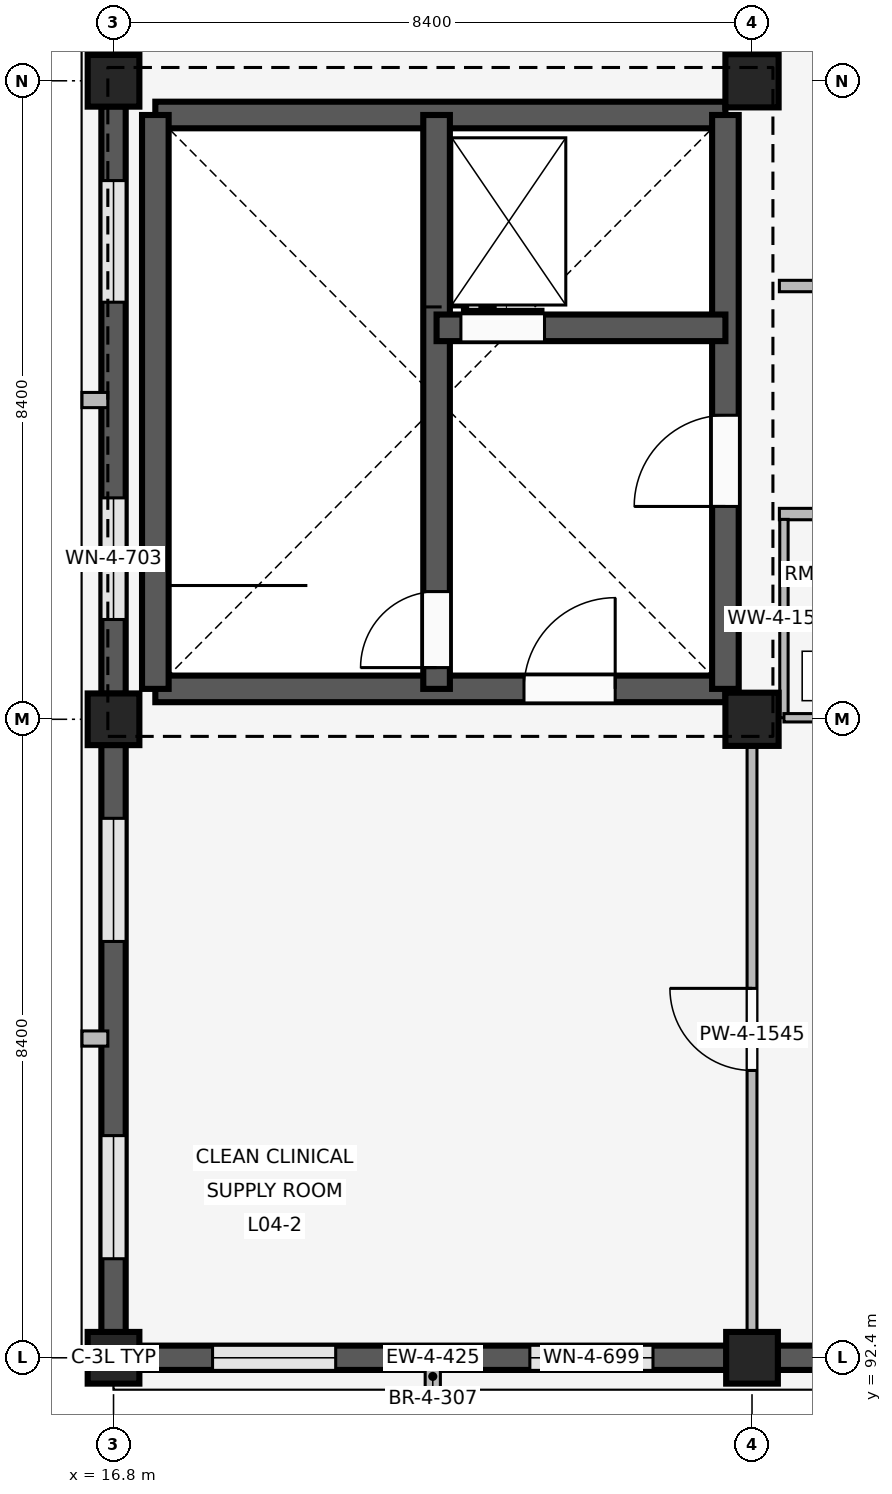
"""IFC4 building model, lengths in metres.
Left out: names, types, materials, properties, quantities, classifications, styles, units other than length and angle.
Written with IfcOpenShell. Run it as: python <this file> out.ifc"""

import sys

from ifc_helpers import new_model, si_unit, direction, frame, frame_2d, origin, origin_2d, place, context, subcontext, project, spatial, rectangle, extrude, element, fill, save


model = new_model("IFC4")
c1 = context("Model", 3, precision=1e-05, world=origin(), true_north=direction((0.0, 1.0)))
c2 = subcontext(c1, "Body", "Model", "MODEL_VIEW")
j1 = project(units=[si_unit("LENGTHUNIT", "METRE"), si_unit("PLANEANGLEUNIT", "RADIAN")], contexts=[c1])
p1 = place(None, origin())
s1 = spatial("IfcSite", under=j1, at=p1, CompositionType="ELEMENT")
p2 = place(p1, origin())
s2 = spatial("IfcBuilding", under=s1, at=p2, CompositionType="ELEMENT")
p3 = place(p2, frame((0.0, 0.0, 16.2)))
s3 = spatial("IfcBuildingStorey", under=s2, at=p3, CompositionType="ELEMENT", Elevation=16.2)
for number, where, z_axis, x_axis in (
    (1, (16.8, 92.4, 0.0), (0.0, 0.0, 1.0), (1.0, 0.0, 0.0)),
    (2, (16.8, 100.8, 0.0), (0.0, 0.0, 1.0), (1.0, 0.0, 0.0)),
    (3, (16.8, 109.2, 0.0), (0.0, 0.0, 1.0), (1.0, 0.0, 0.0)),
    (4, (25.2, 92.4, 0.0), (0.0, 0.0, 1.0), (1.0, 0.0, 0.0)),
):
    element("IfcColumn", number, at=place(p3, frame(where, z_axis=z_axis, x_axis=x_axis)), inside=s3, PredefinedType="COLUMN", context=c2, shape_type="SweptSolid", body=[
        extrude(rectangle(XDim=0.68, YDim=0.68, at=origin_2d()), origin(), (0.0, 0.0, 1.0), 4.2),
    ])
for number, where, z_axis, x_axis in (
    (5, (25.2, 100.8, 0.0), (0.0, 0.0, 1.0), (1.0, 0.0, 0.0)),
    (6, (25.2, 109.2, 0.0), (0.0, 0.0, 1.0), (1.0, 0.0, 0.0)),
):
    element("IfcColumn", number, at=place(p3, frame(where, z_axis=z_axis, x_axis=x_axis)), inside=s3, PredefinedType="COLUMN", context=c2, shape_type="SweptSolid", body=[
        extrude(rectangle(XDim=0.7, YDim=0.7, at=origin_2d()), origin(), (0.0, 0.0, 1.0), 4.2),
    ])
p4 = place(p3, frame((24.865, 92.4, 0.0), z_axis=(0.0, 0.0, 1.0), x_axis=(-1.0, 0.0, 0.0)))
e7 = element("IfcWall", 7, at=p4, inside=s3, PredefinedType="SOLIDWALL", context=c2, shape_type="SweptSolid", body=[
    extrude(rectangle(XDim=7.73, YDim=0.32, at=frame_2d((3.865, 0.0))), origin(), (0.0, 0.0, 1.0), 3.32),
])
p5 = place(p4, frame((0.968, 0.0, 0.85)))
e8 = element("IfcOpeningElement", 8, at=p5, cuts=e7, PredefinedType="OPENING", context=c2, shape_type="SweptSolid", body=[
    extrude(rectangle(XDim=1.62, YDim=1.52, at=frame_2d((0.81, 0.76))), frame((0.0, 0.17, 0.0), z_axis=(0.0, -1.0, 0.0), x_axis=(1.0, 0.0, 0.0)), (0.0, 0.0, 1.0), 0.34),
])
p6 = place(p4, frame((5.142, 0.0, 0.85)))
e9 = element("IfcOpeningElement", 9, at=p6, cuts=e7, PredefinedType="OPENING", context=c2, shape_type="SweptSolid", body=[
    extrude(rectangle(XDim=1.62, YDim=1.52, at=frame_2d((0.81, 0.76))), frame((0.0, 0.17, 0.0), z_axis=(0.0, -1.0, 0.0), x_axis=(1.0, 0.0, 0.0)), (0.0, 0.0, 1.0), 0.34),
])
p7 = place(p3, frame((21.0, 92.325, 0.0), z_axis=(0.0, 0.0, 1.0), x_axis=(0.0, -1.0, 0.0)))
e10 = element("IfcWall", 10, at=p7, inside=s3, PredefinedType="ELEMENTEDWALL", context=c2, shape_type="SweptSolid", body=[
    extrude(rectangle(XDim=0.34, YDim=0.2, at=frame_2d((0.17, 0.0))), origin(), (0.0, 0.0, 1.0), 3.3),
])
p8 = place(p3, frame((16.8, 92.735, 0.0), z_axis=(0.0, 0.0, 1.0), x_axis=(0.0, 1.0, 0.0)))
e11 = element("IfcWall", 11, at=p8, inside=s3, PredefinedType="SOLIDWALL", context=c2, shape_type="SweptSolid", body=[
    extrude(rectangle(XDim=7.73, YDim=0.32, at=frame_2d((3.865, 0.0))), origin(), (0.0, 0.0, 1.0), 3.32),
])
p9 = place(p8, frame((0.968, 0.0, 0.85)))
e12 = element("IfcOpeningElement", 12, at=p9, cuts=e11, PredefinedType="OPENING", context=c2, shape_type="SweptSolid", body=[
    extrude(rectangle(XDim=1.62, YDim=1.52, at=frame_2d((0.81, 0.76))), frame((0.0, 0.17, 0.0), z_axis=(0.0, -1.0, 0.0), x_axis=(1.0, 0.0, 0.0)), (0.0, 0.0, 1.0), 0.34),
])
p10 = place(p8, frame((5.142, 0.0, 0.85)))
e13 = element("IfcOpeningElement", 13, at=p10, cuts=e11, PredefinedType="OPENING", context=c2, shape_type="SweptSolid", body=[
    extrude(rectangle(XDim=1.62, YDim=1.52, at=frame_2d((0.81, 0.76))), frame((0.0, 0.17, 0.0), z_axis=(0.0, -1.0, 0.0), x_axis=(1.0, 0.0, 0.0)), (0.0, 0.0, 1.0), 0.34),
])
p11 = place(p3, frame((16.725, 96.6, 0.0), z_axis=(0.0, 0.0, 1.0), x_axis=(-1.0, 0.0, 0.0)))
e14 = element("IfcWall", 14, at=p11, inside=s3, PredefinedType="ELEMENTEDWALL", context=c2, shape_type="SweptSolid", body=[
    extrude(rectangle(XDim=0.34, YDim=0.2, at=frame_2d((0.17, 0.0))), origin(), (0.0, 0.0, 1.0), 3.3),
])
p12 = place(p3, frame((16.8, 101.135, 0.0), z_axis=(0.0, 0.0, 1.0), x_axis=(0.0, 1.0, 0.0)))
e15 = element("IfcWall", 15, at=p12, inside=s3, PredefinedType="SOLIDWALL", context=c2, shape_type="SweptSolid", body=[
    extrude(rectangle(XDim=7.73, YDim=0.32, at=frame_2d((3.865, 0.0))), origin(), (0.0, 0.0, 1.0), 3.32),
])
p13 = place(p12, frame((0.978, 0.0, 0.85)))
e16 = element("IfcOpeningElement", 16, at=p13, cuts=e15, PredefinedType="OPENING", context=c2, shape_type="SweptSolid", body=[
    extrude(rectangle(XDim=1.6, YDim=1.65, at=frame_2d((0.8, 0.825))), frame((0.0, 0.17, 0.0), z_axis=(0.0, -1.0, 0.0), x_axis=(1.0, 0.0, 0.0)), (0.0, 0.0, 1.0), 0.34),
])
p14 = place(p12, frame((5.152, 0.0, 0.85)))
e17 = element("IfcOpeningElement", 17, at=p14, cuts=e15, PredefinedType="OPENING", context=c2, shape_type="SweptSolid", body=[
    extrude(rectangle(XDim=1.6, YDim=1.65, at=frame_2d((0.8, 0.825))), frame((0.0, 0.17, 0.0), z_axis=(0.0, -1.0, 0.0), x_axis=(1.0, 0.0, 0.0)), (0.0, 0.0, 1.0), 0.34),
])
p15 = place(p3, frame((16.725, 105.0, 0.0), z_axis=(0.0, 0.0, 1.0), x_axis=(-1.0, 0.0, 0.0)))
e18 = element("IfcWall", 18, at=p15, inside=s3, PredefinedType="ELEMENTEDWALL", context=c2, shape_type="SweptSolid", body=[
    extrude(rectangle(XDim=0.34, YDim=0.2, at=frame_2d((0.17, 0.0))), origin(), (0.0, 0.0, 1.0), 3.3),
])
p16 = place(p3, frame((16.8, 109.535, 0.0), z_axis=(0.0, 0.0, 1.0), x_axis=(0.0, 1.0, 0.0)))
e19 = element("IfcWall", 19, at=p16, inside=s3, PredefinedType="SOLIDWALL", context=c2, shape_type="SweptSolid", body=[
    extrude(rectangle(XDim=7.73, YDim=0.32, at=frame_2d((3.865, 0.0))), origin(), (0.0, 0.0, 1.0), 3.32),
])
p17 = place(p16, frame((1.018, 0.0, 0.85)))
e20 = element("IfcOpeningElement", 20, at=p17, cuts=e19, PredefinedType="OPENING", context=c2, shape_type="SweptSolid", body=[
    extrude(rectangle(XDim=1.52, YDim=1.65, at=frame_2d((0.76, 0.825))), frame((0.0, 0.17, 0.0), z_axis=(0.0, -1.0, 0.0), x_axis=(1.0, 0.0, 0.0)), (0.0, 0.0, 1.0), 0.34),
])
p18 = place(p16, frame((5.192, 0.0, 0.85)))
e21 = element("IfcOpeningElement", 21, at=p18, cuts=e19, PredefinedType="OPENING", context=c2, shape_type="SweptSolid", body=[
    extrude(rectangle(XDim=1.52, YDim=1.65, at=frame_2d((0.76, 0.825))), frame((0.0, 0.17, 0.0), z_axis=(0.0, -1.0, 0.0), x_axis=(1.0, 0.0, 0.0)), (0.0, 0.0, 1.0), 0.34),
])
p19 = place(p3, frame((33.265, 92.4, 0.0), z_axis=(0.0, 0.0, 1.0), x_axis=(-1.0, 0.0, 0.0)))
e22 = element("IfcWall", 22, at=p19, inside=s3, PredefinedType="SOLIDWALL", context=c2, shape_type="SweptSolid", body=[
    extrude(rectangle(XDim=7.73, YDim=0.32, at=frame_2d((3.865, 0.0))), origin(), (0.0, 0.0, 1.0), 3.32),
])
p20 = place(p19, frame((0.978, 0.0, 0.85)))
e23 = element("IfcOpeningElement", 23, at=p20, cuts=e22, PredefinedType="OPENING", context=c2, shape_type="SweptSolid", body=[
    extrude(rectangle(XDim=1.6, YDim=1.65, at=frame_2d((0.8, 0.825))), frame((0.0, 0.17, 0.0), z_axis=(0.0, -1.0, 0.0), x_axis=(1.0, 0.0, 0.0)), (0.0, 0.0, 1.0), 0.34),
])
p21 = place(p19, frame((5.152, 0.0, 0.85)))
e24 = element("IfcOpeningElement", 24, at=p21, cuts=e22, PredefinedType="OPENING", context=c2, shape_type="SweptSolid", body=[
    extrude(rectangle(XDim=1.6, YDim=1.65, at=frame_2d((0.8, 0.825))), frame((0.0, 0.17, 0.0), z_axis=(0.0, -1.0, 0.0), x_axis=(1.0, 0.0, 0.0)), (0.0, 0.0, 1.0), 0.34),
])
p22 = place(p3, frame((17.35, 101.2, 0.0), z_axis=(0.0, 0.0, 1.0), x_axis=(1.0, 0.0, 0.0)))
e25 = element("IfcWall", 25, at=p22, inside=s3, PredefinedType="SHEAR", context=c2, shape_type="SweptSolid", body=[
    extrude(rectangle(XDim=7.5, YDim=0.35, at=frame_2d((3.75, 0.0))), origin(), (0.0, 0.0, 1.0), 3.92),
])
p23 = place(p22, frame((4.85, 0.0, 0.0)))
e26 = element("IfcOpeningElement", 26, at=p23, cuts=e25, PredefinedType="OPENING", context=c2, shape_type="SweptSolid", body=[
    extrude(rectangle(XDim=1.2, YDim=2.2, at=frame_2d((0.6, 1.1))), frame((0.0, 0.185, 0.0), z_axis=(0.0, -1.0, 0.0), x_axis=(1.0, 0.0, 0.0)), (0.0, 0.0, 1.0), 0.37),
])
p24 = place(p3, frame((17.35, 108.75, 0.0), z_axis=(0.0, 0.0, 1.0), x_axis=(1.0, 0.0, 0.0)))
e27 = element("IfcWall", 27, at=p24, inside=s3, PredefinedType="SHEAR", context=c2, shape_type="SweptSolid", body=[
    extrude(rectangle(XDim=7.5, YDim=0.35, at=frame_2d((3.75, 0.0))), origin(), (0.0, 0.0, 1.0), 3.92),
])
p25 = place(p3, frame((17.35, 101.2, 0.0), z_axis=(0.0, 0.0, 1.0), x_axis=(0.0, 1.0, 0.0)))
e28 = element("IfcWall", 28, at=p25, inside=s3, PredefinedType="SHEAR", context=c2, shape_type="SweptSolid", body=[
    extrude(rectangle(XDim=7.55, YDim=0.35, at=frame_2d((3.775, 0.0))), origin(), (0.0, 0.0, 1.0), 3.92),
])
p26 = place(p3, frame((24.85, 101.2, 0.0), z_axis=(0.0, 0.0, 1.0), x_axis=(0.0, 1.0, 0.0)))
e29 = element("IfcWall", 29, at=p26, inside=s3, PredefinedType="SHEAR", context=c2, shape_type="SweptSolid", body=[
    extrude(rectangle(XDim=7.55, YDim=0.35, at=frame_2d((3.775, 0.0))), origin(), (0.0, 0.0, 1.0), 3.92),
])
p27 = place(p26, frame((2.4, 0.0, 0.0)))
e30 = element("IfcOpeningElement", 30, at=p27, cuts=e29, PredefinedType="OPENING", context=c2, shape_type="SweptSolid", body=[
    extrude(rectangle(XDim=1.2, YDim=2.2, at=frame_2d((0.6, 1.1))), frame((0.0, 0.185, 0.0), z_axis=(0.0, -1.0, 0.0), x_axis=(1.0, 0.0, 0.0)), (0.0, 0.0, 1.0), 0.37),
])
p28 = place(p3, frame((21.05, 101.2, 0.0), z_axis=(0.0, 0.0, 1.0), x_axis=(0.0, 1.0, 0.0)))
e31 = element("IfcWall", 31, at=p28, inside=s3, PredefinedType="SHEAR", context=c2, shape_type="SweptSolid", body=[
    extrude(rectangle(XDim=7.55, YDim=0.35, at=frame_2d((3.775, 0.0))), origin(), (0.0, 0.0, 1.0), 3.92),
])
p29 = place(p28, frame((0.28, 0.0, 0.0)))
e32 = element("IfcOpeningElement", 32, at=p29, cuts=e31, PredefinedType="OPENING", context=c2, shape_type="SweptSolid", body=[
    extrude(rectangle(XDim=1.0, YDim=2.15, at=frame_2d((0.5, 1.075))), frame((0.0, 0.185, 0.0), z_axis=(0.0, -1.0, 0.0), x_axis=(1.0, 0.0, 0.0)), (0.0, 0.0, 1.0), 0.37),
])
p30 = place(p3, frame((21.05, 105.95, 0.0), z_axis=(0.0, 0.0, 1.0), x_axis=(1.0, 0.0, 0.0)))
e33 = element("IfcWall", 33, at=p30, inside=s3, PredefinedType="SHEAR", context=c2, shape_type="SweptSolid", body=[
    extrude(rectangle(XDim=3.8, YDim=0.35, at=frame_2d((1.9, 0.0))), origin(), (0.0, 0.0, 1.0), 3.92),
])
p31 = place(p30, frame((0.32, 0.0, 0.0)))
e34 = element("IfcOpeningElement", 34, at=p31, cuts=e33, PredefinedType="OPENING", context=c2, shape_type="SweptSolid", body=[
    extrude(rectangle(XDim=1.1, YDim=2.15, at=frame_2d((0.55, 1.075))), frame((0.0, 0.185, 0.0), z_axis=(0.0, -1.0, 0.0), x_axis=(1.0, 0.0, 0.0)), (0.0, 0.0, 1.0), 0.37),
])
p32 = place(p3, frame((25.2, 92.54, 0.0), z_axis=(0.0, 0.0, 1.0), x_axis=(0.0, 1.0, 0.0)))
e35 = element("IfcWall", 35, at=p32, inside=s3, PredefinedType="PARTITIONING", context=c2, shape_type="SweptSolid", body=[
    extrude(rectangle(XDim=8.21, YDim=0.13, at=frame_2d((4.105, 0.0))), origin(), (0.0, 0.0, 1.0), 3.3),
])
p33 = place(p32, frame((3.64, 0.0, 0.0)))
e36 = element("IfcOpeningElement", 36, at=p33, cuts=e35, PredefinedType="OPENING", context=c2, shape_type="SweptSolid", body=[
    extrude(rectangle(XDim=1.08, YDim=2.15, at=frame_2d((0.54, 1.075))), frame((0.0, 0.075, 0.0), z_axis=(0.0, -1.0, 0.0), x_axis=(1.0, 0.0, 0.0)), (0.0, 0.0, 1.0), 0.15),
])
p34 = place(p3, frame((25.2, 109.55, 0.0), z_axis=(0.0, 0.0, 1.0), x_axis=(0.0, 1.0, 0.0)))
e37 = element("IfcWall", 37, at=p34, inside=s3, PredefinedType="PARTITIONING", context=c2, shape_type="SweptSolid", body=[
    extrude(rectangle(XDim=7.91, YDim=0.13, at=frame_2d((3.955, 0.0))), origin(), (0.0, 0.0, 1.0), 3.3),
])
p35 = place(p34, frame((3.4, 0.0, 0.0)))
e38 = element("IfcOpeningElement", 38, at=p35, cuts=e37, PredefinedType="OPENING", context=c2, shape_type="SweptSolid", body=[
    extrude(rectangle(XDim=1.05, YDim=2.2, at=frame_2d((0.525, 1.1))), frame((0.0, 0.075, 0.0), z_axis=(0.0, -1.0, 0.0), x_axis=(1.0, 0.0, 0.0)), (0.0, 0.0, 1.0), 0.15),
])
p36 = place(p3, frame((25.56, 103.5, 0.0), z_axis=(0.0, 0.0, 1.0), x_axis=(1.0, 0.0, 0.0)))
e39 = element("IfcWall", 39, at=p36, inside=s3, PredefinedType="PARTITIONING", context=c2, shape_type="SweptSolid", body=[
    extrude(rectangle(XDim=7.96, YDim=0.15, at=frame_2d((3.98, 0.0))), origin(), (0.0, 0.0, 1.0), 3.3),
])
p37 = place(p36, frame((2.25, 0.0, 0.0)))
e40 = element("IfcOpeningElement", 40, at=p37, cuts=e39, PredefinedType="OPENING", context=c2, shape_type="SweptSolid", body=[
    extrude(rectangle(XDim=1.3, YDim=2.25, at=frame_2d((0.65, 1.125))), frame((0.0, 0.085, 0.0), z_axis=(0.0, -1.0, 0.0), x_axis=(1.0, 0.0, 0.0)), (0.0, 0.0, 1.0), 0.17),
])
p38 = place(p36, frame((5.95, 0.0, 0.0)))
e41 = element("IfcOpeningElement", 41, at=p38, cuts=e39, PredefinedType="OPENING", context=c2, shape_type="SweptSolid", body=[
    extrude(rectangle(XDim=1.3, YDim=2.25, at=frame_2d((0.65, 1.125))), frame((0.0, 0.085, 0.0), z_axis=(0.0, -1.0, 0.0), x_axis=(1.0, 0.0, 0.0)), (0.0, 0.0, 1.0), 0.17),
])
p39 = place(p3, frame((25.62, 100.82, 0.0), z_axis=(0.0, 0.0, 1.0), x_axis=(0.0, 1.0, 0.0)))
e42 = element("IfcWall", 42, at=p39, inside=s3, PredefinedType="PARTITIONING", context=c2, shape_type="SweptSolid", body=[
    extrude(rectangle(XDim=2.61, YDim=0.11, at=frame_2d((1.305, 0.0))), origin(), (0.0, 0.0, 1.0), 3.3),
])
p40 = place(p3, frame((25.62, 100.82, 0.0), z_axis=(0.0, 0.0, 1.0), x_axis=(1.0, 0.0, 0.0)))
e43 = element("IfcWall", 43, at=p40, inside=s3, PredefinedType="PARTITIONING", context=c2, shape_type="SweptSolid", body=[
    extrude(rectangle(XDim=1.98, YDim=0.11, at=frame_2d((0.99, 0.0))), origin(), (0.0, 0.0, 1.0), 3.3),
])
p41 = place(p40, frame((0.54, 0.0, 0.0)))
e44 = element("IfcOpeningElement", 44, at=p41, cuts=e43, PredefinedType="OPENING", context=c2, shape_type="SweptSolid", body=[
    extrude(rectangle(XDim=0.9, YDim=2.1, at=frame_2d((0.45, 1.05))), frame((0.0, 0.065, 0.0), z_axis=(0.0, -1.0, 0.0), x_axis=(1.0, 0.0, 0.0)), (0.0, 0.0, 1.0), 0.13),
])
p42 = place(p3, frame((33.52, 106.5, 0.0), z_axis=(0.0, 0.0, 1.0), x_axis=(-1.0, 0.0, 0.0)))
e45 = element("IfcWall", 45, at=p42, inside=s3, PredefinedType="PARTITIONING", context=c2, shape_type="SweptSolid", body=[
    extrude(rectangle(XDim=7.96, YDim=0.15, at=frame_2d((3.98, 0.0))), origin(), (0.0, 0.0, 1.0), 3.3),
])
p43 = place(p42, frame((3.355, 0.0, 0.0)))
e46 = element("IfcOpeningElement", 46, at=p43, cuts=e45, PredefinedType="OPENING", context=c2, shape_type="SweptSolid", body=[
    extrude(rectangle(XDim=1.25, YDim=2.2, at=frame_2d((0.625, 1.1))), frame((0.0, 0.085, 0.0), z_axis=(0.0, -1.0, 0.0), x_axis=(1.0, 0.0, 0.0)), (0.0, 0.0, 1.0), 0.17),
])
p44 = place(p5, origin())
e47 = element("IfcWindow", 47, at=p44, inside=s3, PartitioningType="SINGLE_PANEL", PredefinedType="WINDOW", context=c2, shape_type="SweptSolid", body=[
    extrude(rectangle(XDim=1.62, YDim=1.52, at=frame_2d((0.81, 0.76))), frame((0.0, 0.03, 0.0), z_axis=(0.0, -1.0, 0.0), x_axis=(1.0, 0.0, 0.0)), (0.0, 0.0, 1.0), 0.06),
])
fill(e8, e47)
p45 = place(p6, origin())
e48 = element("IfcWindow", 48, at=p45, inside=s3, PartitioningType="SINGLE_PANEL", PredefinedType="WINDOW", context=c2, shape_type="SweptSolid", body=[
    extrude(rectangle(XDim=1.62, YDim=1.52, at=frame_2d((0.81, 0.76))), frame((0.0, 0.03, 0.0), z_axis=(0.0, -1.0, 0.0), x_axis=(1.0, 0.0, 0.0)), (0.0, 0.0, 1.0), 0.06),
])
fill(e9, e48)
p46 = place(p9, origin())
e49 = element("IfcWindow", 49, at=p46, inside=s3, PartitioningType="SINGLE_PANEL", PredefinedType="WINDOW", context=c2, shape_type="SweptSolid", body=[
    extrude(rectangle(XDim=1.62, YDim=1.52, at=frame_2d((0.81, 0.76))), frame((0.0, 0.03, 0.0), z_axis=(0.0, -1.0, 0.0), x_axis=(1.0, 0.0, 0.0)), (0.0, 0.0, 1.0), 0.06),
])
fill(e12, e49)
p47 = place(p10, origin())
e50 = element("IfcWindow", 50, at=p47, inside=s3, PartitioningType="SINGLE_PANEL", PredefinedType="WINDOW", context=c2, shape_type="SweptSolid", body=[
    extrude(rectangle(XDim=1.62, YDim=1.52, at=frame_2d((0.81, 0.76))), frame((0.0, 0.03, 0.0), z_axis=(0.0, -1.0, 0.0), x_axis=(1.0, 0.0, 0.0)), (0.0, 0.0, 1.0), 0.06),
])
fill(e13, e50)
p48 = place(p13, origin())
e51 = element("IfcWindow", 51, at=p48, inside=s3, PartitioningType="SINGLE_PANEL", PredefinedType="WINDOW", context=c2, shape_type="SweptSolid", body=[
    extrude(rectangle(XDim=1.6, YDim=1.65, at=frame_2d((0.8, 0.825))), frame((0.0, 0.03, 0.0), z_axis=(0.0, -1.0, 0.0), x_axis=(1.0, 0.0, 0.0)), (0.0, 0.0, 1.0), 0.06),
])
fill(e16, e51)
p49 = place(p14, origin())
e52 = element("IfcWindow", 52, at=p49, inside=s3, PartitioningType="SINGLE_PANEL", PredefinedType="WINDOW", context=c2, shape_type="SweptSolid", body=[
    extrude(rectangle(XDim=1.6, YDim=1.65, at=frame_2d((0.8, 0.825))), frame((0.0, 0.03, 0.0), z_axis=(0.0, -1.0, 0.0), x_axis=(1.0, 0.0, 0.0)), (0.0, 0.0, 1.0), 0.06),
])
fill(e17, e52)
p50 = place(p27, origin())
e53 = element("IfcDoor", 53, at=p50, inside=s3, OperationType="SINGLE_SWING_LEFT", PredefinedType="DOOR", context=c2, shape_type="SweptSolid", body=[
    extrude(rectangle(XDim=1.2, YDim=2.2, at=frame_2d((0.6, 1.1))), frame((0.0, 0.025, 0.0), z_axis=(0.0, -1.0, 0.0), x_axis=(1.0, 0.0, 0.0)), (0.0, 0.0, 1.0), 0.05),
])
fill(e30, e53)
p51 = place(p23, origin())
e54 = element("IfcDoor", 54, at=p51, inside=s3, OperationType="SINGLE_SWING_RIGHT", PredefinedType="DOOR", context=c2, shape_type="SweptSolid", body=[
    extrude(rectangle(XDim=1.2, YDim=2.2, at=frame_2d((0.6, 1.1))), frame((0.0, 0.025, 0.0), z_axis=(0.0, -1.0, 0.0), x_axis=(1.0, 0.0, 0.0)), (0.0, 0.0, 1.0), 0.05),
])
fill(e26, e54)
p52 = place(p29, origin())
e55 = element("IfcDoor", 55, at=p52, inside=s3, OperationType="SINGLE_SWING_LEFT", PredefinedType="DOOR", context=c2, shape_type="SweptSolid", body=[
    extrude(rectangle(XDim=1.0, YDim=2.15, at=frame_2d((0.5, 1.075))), frame((0.0, 0.025, 0.0), z_axis=(0.0, -1.0, 0.0), x_axis=(1.0, 0.0, 0.0)), (0.0, 0.0, 1.0), 0.05),
])
fill(e32, e55)
p53 = place(p31, origin())
e56 = element("IfcDoor", 56, at=p53, inside=s3, OperationType="SLIDING_TO_LEFT", PredefinedType="DOOR", context=c2, shape_type="SweptSolid", body=[
    extrude(rectangle(XDim=1.1, YDim=2.15, at=frame_2d((0.55, 1.075))), frame((0.0, 0.025, 0.0), z_axis=(0.0, -1.0, 0.0), x_axis=(1.0, 0.0, 0.0)), (0.0, 0.0, 1.0), 0.05),
])
fill(e34, e56)
p54 = place(p33, origin())
e57 = element("IfcDoor", 57, at=p54, inside=s3, OperationType="SINGLE_SWING_RIGHT", PredefinedType="DOOR", context=c2, shape_type="SweptSolid", body=[
    extrude(rectangle(XDim=1.08, YDim=2.15, at=frame_2d((0.54, 1.075))), frame((0.0, 0.025, 0.0), z_axis=(0.0, -1.0, 0.0), x_axis=(1.0, 0.0, 0.0)), (0.0, 0.0, 1.0), 0.05),
])
fill(e36, e57)
save(model, sys.argv[1])
